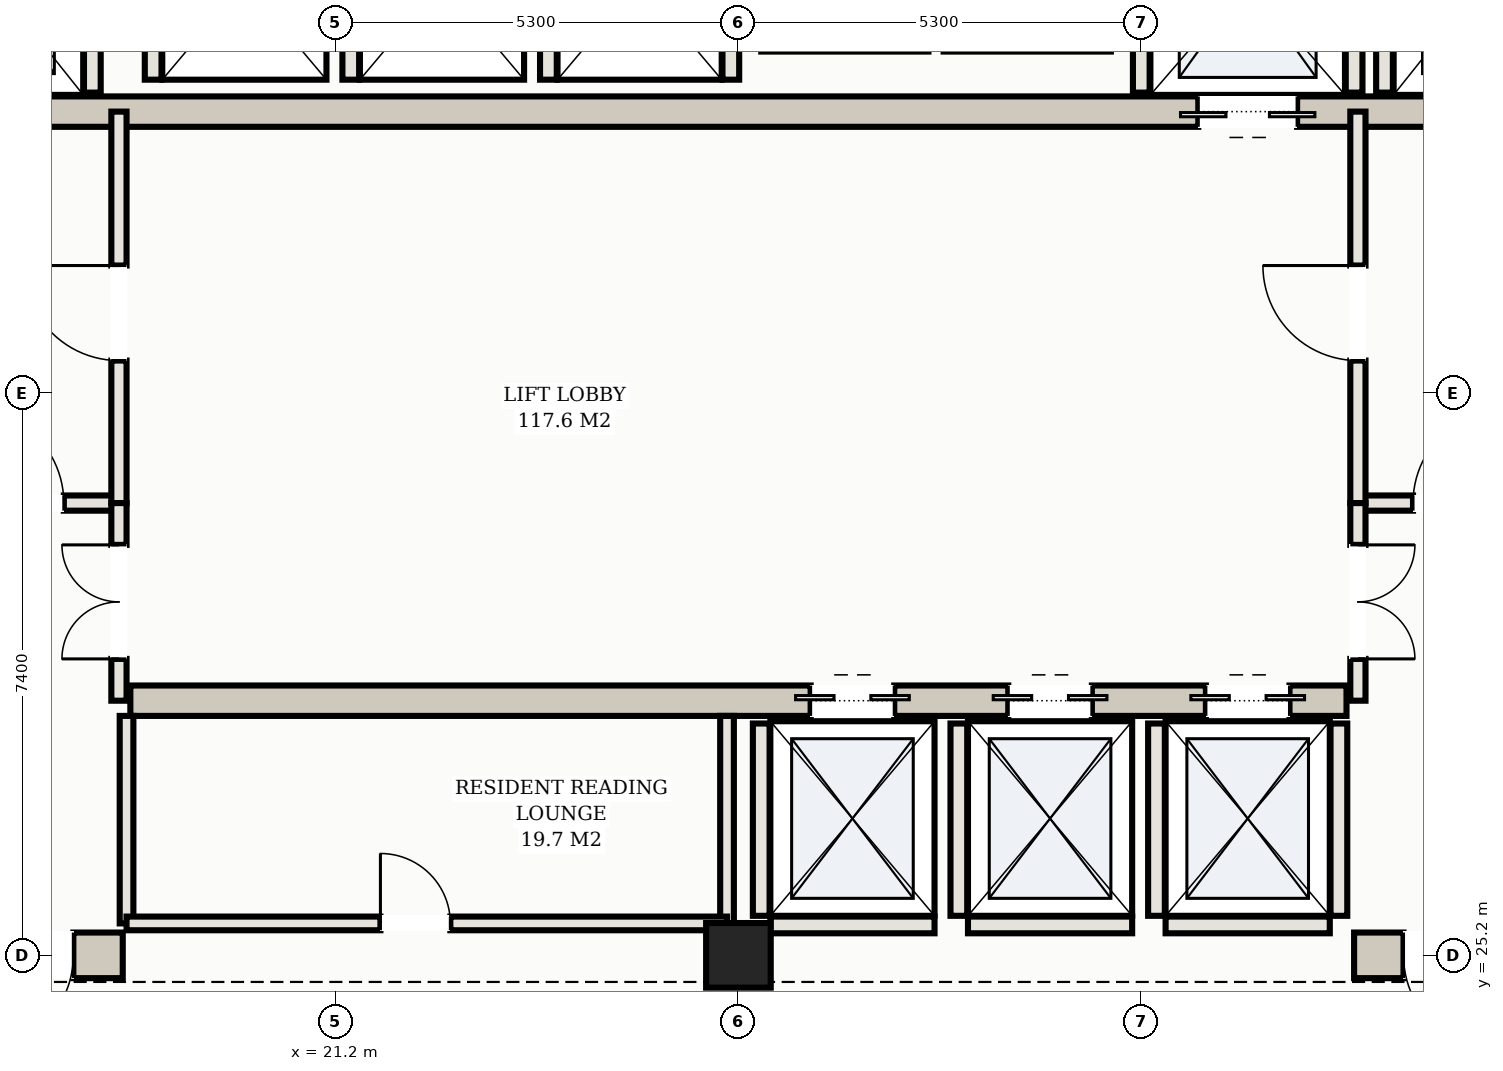
"""IFC4 building model, lengths in metres.
Left out: names, types, materials, properties, quantities, classifications, styles, units other than length and angle.
Written with IfcOpenShell. Run it as: python <this file> out.ifc"""

import sys

from ifc_helpers import new_model, si_unit, direction, frame, frame_2d, origin, origin_2d, place, context, subcontext, project, spatial, rectangle, hollow_rectangle, extrude, element, fill, save


model = new_model("IFC4")
c1 = context("Model", 3, precision=1e-05, world=origin(), true_north=direction((0.0, 1.0)))
c2 = subcontext(c1, "Body", "Model", "MODEL_VIEW")
j1 = project(units=[si_unit("LENGTHUNIT", "METRE"), si_unit("PLANEANGLEUNIT", "RADIAN")], contexts=[c1])
p1 = place(None, origin())
s1 = spatial("IfcSite", under=j1, at=p1, CompositionType="ELEMENT")
p2 = place(p1, origin())
s2 = spatial("IfcBuilding", under=s1, at=p2, CompositionType="ELEMENT")
p3 = place(p2, frame((0.0, 0.0, 168.9)))
s3 = spatial("IfcBuildingStorey", under=s2, at=p3, CompositionType="ELEMENT", Elevation=168.9)
p4 = place(p3, frame((10.3, 25.2, 0.0), z_axis=(0.0, 0.0, 1.0), x_axis=(1.0, 0.0, 0.0)))
e1 = element("IfcWall", 1, at=p4, inside=s3, PredefinedType="SHEAR", context=c2, shape_type="SweptSolid", body=[
    extrude(rectangle(XDim=8.1, YDim=0.6, at=frame_2d((4.05, 0.0))), origin(), (0.0, 0.0, 1.0), 3.1),
])
p5 = place(p4, frame((6.2, 0.0, 0.0)))
e2 = element("IfcOpeningElement", 2, at=p5, cuts=e1, PredefinedType="OPENING", context=c2, shape_type="SweptSolid", body=[
    extrude(rectangle(XDim=1.25, YDim=2.2, at=frame_2d((0.625, 1.1))), frame((0.0, 0.31, 0.0), z_axis=(0.0, -1.0, 0.0), x_axis=(1.0, 0.0, 0.0)), (0.0, 0.0, 1.0), 0.62),
])
p6 = place(p3, frame((34.6, 25.2, 0.0), z_axis=(0.0, 0.0, 1.0), x_axis=(1.0, 0.0, 0.0)))
e3 = element("IfcWall", 3, at=p6, inside=s3, PredefinedType="SHEAR", context=c2, shape_type="SweptSolid", body=[
    extrude(rectangle(XDim=8.1, YDim=0.6, at=frame_2d((4.05, 0.0))), origin(), (0.0, 0.0, 1.0), 3.1),
])
p7 = place(p6, frame((0.65, 0.0, 0.0)))
e4 = element("IfcOpeningElement", 4, at=p7, cuts=e3, PredefinedType="OPENING", context=c2, shape_type="SweptSolid", body=[
    extrude(rectangle(XDim=1.25, YDim=2.2, at=frame_2d((0.625, 1.1))), frame((0.0, 0.31, 0.0), z_axis=(0.0, -1.0, 0.0), x_axis=(1.0, 0.0, 0.0)), (0.0, 0.0, 1.0), 0.62),
])
p8 = place(p3, frame((15.5, 36.3, 0.0), z_axis=(0.0, 0.0, 1.0), x_axis=(1.0, 0.0, 0.0)))
e5 = element("IfcWall", 5, at=p8, inside=s3, PredefinedType="SHEAR", context=c2, shape_type="SweptSolid", body=[
    extrude(rectangle(XDim=22.0, YDim=0.4, at=frame_2d((11.0, 0.0))), origin(), (0.0, 0.0, 1.0), 3.1),
])
p9 = place(p8, frame((0.65, 0.0, 0.0)))
e6 = element("IfcOpeningElement", 6, at=p9, cuts=e5, PredefinedType="OPENING", context=c2, shape_type="SweptSolid", body=[
    extrude(rectangle(XDim=1.1, YDim=2.15, at=frame_2d((0.55, 1.075))), frame((0.0, 0.21, 0.0), z_axis=(0.0, -1.0, 0.0), x_axis=(1.0, 0.0, 0.0)), (0.0, 0.0, 1.0), 0.42),
])
p10 = place(p8, frame((20.25, 0.0, 0.0)))
e7 = element("IfcOpeningElement", 7, at=p10, cuts=e5, PredefinedType="OPENING", context=c2, shape_type="SweptSolid", body=[
    extrude(rectangle(XDim=1.1, YDim=2.15, at=frame_2d((0.55, 1.075))), frame((0.0, 0.21, 0.0), z_axis=(0.0, -1.0, 0.0), x_axis=(1.0, 0.0, 0.0)), (0.0, 0.0, 1.0), 0.42),
])
p11 = place(p8, frame((17.05, 0.0, 0.0)))
e8 = element("IfcOpeningElement", 8, at=p11, cuts=e5, PredefinedType="OPENING", context=c2, shape_type="SweptSolid", body=[
    extrude(rectangle(XDim=1.3, YDim=2.2, at=frame_2d((0.65, 1.1))), frame((0.0, 0.21, 0.0), z_axis=(0.0, -1.0, 0.0), x_axis=(1.0, 0.0, 0.0)), (0.0, 0.0, 1.0), 0.42),
])
p12 = place(p3, frame((18.5, 28.55, 0.0), z_axis=(0.0, 0.0, 1.0), x_axis=(1.0, 0.0, 0.0)))
e9 = element("IfcWall", 9, at=p12, inside=s3, PredefinedType="SHEAR", context=c2, shape_type="SweptSolid", body=[
    extrude(rectangle(XDim=16.0, YDim=0.4, at=frame_2d((8.0, 0.0))), origin(), (0.0, 0.0, 1.0), 3.1),
])
p13 = place(p12, frame((8.95, 0.0, 0.0)))
e10 = element("IfcOpeningElement", 10, at=p13, cuts=e9, PredefinedType="OPENING", context=c2, shape_type="SweptSolid", body=[
    extrude(rectangle(XDim=1.1, YDim=2.15, at=frame_2d((0.55, 1.075))), frame((0.0, 0.21, 0.0), z_axis=(0.0, -1.0, 0.0), x_axis=(1.0, 0.0, 0.0)), (0.0, 0.0, 1.0), 0.42),
])
p14 = place(p12, frame((11.55, 0.0, 0.0)))
e11 = element("IfcOpeningElement", 11, at=p14, cuts=e9, PredefinedType="OPENING", context=c2, shape_type="SweptSolid", body=[
    extrude(rectangle(XDim=1.1, YDim=2.15, at=frame_2d((0.55, 1.075))), frame((0.0, 0.21, 0.0), z_axis=(0.0, -1.0, 0.0), x_axis=(1.0, 0.0, 0.0)), (0.0, 0.0, 1.0), 0.42),
])
p15 = place(p12, frame((14.15, 0.0, 0.0)))
e12 = element("IfcOpeningElement", 12, at=p15, cuts=e9, PredefinedType="OPENING", context=c2, shape_type="SweptSolid", body=[
    extrude(rectangle(XDim=1.1, YDim=2.15, at=frame_2d((0.55, 1.075))), frame((0.0, 0.21, 0.0), z_axis=(0.0, -1.0, 0.0), x_axis=(1.0, 0.0, 0.0)), (0.0, 0.0, 1.0), 0.42),
])
p16 = place(p3, frame((26.5, 25.2, 0.0), z_axis=(0.0, 0.0, 1.0), x_axis=(1.0, 0.0, 0.0)))
e13 = element("IfcColumn", 13, at=p16, inside=s3, PredefinedType="COLUMN", context=c2, shape_type="SweptSolid", body=[
    extrude(hollow_rectangle(XDim=0.85, YDim=0.85, WallThickness=0.028, at=origin_2d()), origin(), (0.0, 0.0, 1.0), 3.3),
])
for number, where, z_axis, x_axis in (
    (14, (18.0, 36.55, 0.0), (0.0, 0.0, 1.0), (0.0, 1.0, 0.0)),
    (15, (35.0, 36.55, 0.0), (0.0, 0.0, 1.0), (0.0, 1.0, 0.0)),
    (16, (31.8, 36.55, 0.0), (0.0, 0.0, 1.0), (0.0, 1.0, 0.0)),
    (17, (34.6, 36.55, 0.0), (0.0, 0.0, 1.0), (0.0, 1.0, 0.0)),
):
    element("IfcWall", number, at=place(p3, frame(where, z_axis=z_axis, x_axis=x_axis)), inside=s3, PredefinedType="SOLIDWALL", context=c2, shape_type="SweptSolid", body=[
        extrude(rectangle(XDim=2.93, YDim=0.22, at=frame_2d((1.465, 0.0))), origin(), (0.0, 0.0, 1.0), 3.1),
    ])
p17 = place(p3, frame((26.8, 25.72, 0.0), z_axis=(0.0, 0.0, 1.0), x_axis=(0.0, 1.0, 0.0)))
e18 = element("IfcWall", 18, at=p17, inside=s3, PredefinedType="SOLIDWALL", context=c2, shape_type="SweptSolid", body=[
    extrude(rectangle(XDim=2.53, YDim=0.22, at=frame_2d((1.265, 0.0))), origin(), (0.0, 0.0, 1.0), 3.1),
])
p18 = place(p3, frame((26.92, 25.6, 0.0), z_axis=(0.0, 0.0, 1.0), x_axis=(1.0, 0.0, 0.0)))
e19 = element("IfcWall", 19, at=p18, inside=s3, PredefinedType="SOLIDWALL", context=c2, shape_type="SweptSolid", body=[
    extrude(rectangle(XDim=2.16, YDim=0.22, at=frame_2d((1.08, 0.0))), origin(), (0.0, 0.0, 1.0), 2.295),
])
p19 = place(p3, frame((29.4, 25.72, 0.0), z_axis=(0.0, 0.0, 1.0), x_axis=(0.0, 1.0, 0.0)))
e20 = element("IfcWall", 20, at=p19, inside=s3, PredefinedType="SOLIDWALL", context=c2, shape_type="SweptSolid", body=[
    extrude(rectangle(XDim=2.53, YDim=0.22, at=frame_2d((1.265, 0.0))), origin(), (0.0, 0.0, 1.0), 3.1),
])
p20 = place(p3, frame((29.52, 25.6, 0.0), z_axis=(0.0, 0.0, 1.0), x_axis=(1.0, 0.0, 0.0)))
e21 = element("IfcWall", 21, at=p20, inside=s3, PredefinedType="SOLIDWALL", context=c2, shape_type="SweptSolid", body=[
    extrude(rectangle(XDim=2.16, YDim=0.22, at=frame_2d((1.08, 0.0))), origin(), (0.0, 0.0, 1.0), 2.295),
])
for number, where, z_axis, x_axis in (
    (22, (32.0, 25.72, 0.0), (0.0, 0.0, 1.0), (0.0, 1.0, 0.0)),
    (23, (34.4, 25.72, 0.0), (0.0, 0.0, 1.0), (0.0, 1.0, 0.0)),
):
    element("IfcWall", number, at=place(p3, frame(where, z_axis=z_axis, x_axis=x_axis)), inside=s3, PredefinedType="SOLIDWALL", context=c2, shape_type="SweptSolid", body=[
        extrude(rectangle(XDim=2.53, YDim=0.22, at=frame_2d((1.265, 0.0))), origin(), (0.0, 0.0, 1.0), 3.1),
    ])
p21 = place(p3, frame((32.12, 25.6, 0.0), z_axis=(0.0, 0.0, 1.0), x_axis=(1.0, 0.0, 0.0)))
e24 = element("IfcWall", 24, at=p21, inside=s3, PredefinedType="SOLIDWALL", context=c2, shape_type="SweptSolid", body=[
    extrude(rectangle(XDim=2.16, YDim=0.22, at=frame_2d((1.08, 0.0))), origin(), (0.0, 0.0, 1.0), 2.295),
])
for number, where, z_axis, x_axis in (
    (25, (18.8, 36.72, 0.0), (0.0, 0.0, 1.0), (0.0, 1.0, 0.0)),
    (26, (21.4, 36.72, 0.0), (0.0, 0.0, 1.0), (0.0, 1.0, 0.0)),
    (27, (24.0, 36.72, 0.0), (0.0, 0.0, 1.0), (0.0, 1.0, 0.0)),
    (28, (26.4, 36.72, 0.0), (0.0, 0.0, 1.0), (0.0, 1.0, 0.0)),
):
    element("IfcWall", number, at=place(p3, frame(where, z_axis=z_axis, x_axis=x_axis)), inside=s3, PredefinedType="SOLIDWALL", context=c2, shape_type="SweptSolid", body=[
        extrude(rectangle(XDim=2.56, YDim=0.22, at=frame_2d((1.28, 0.0))), origin(), (0.0, 0.0, 1.0), 3.1),
    ])
p22 = place(p3, frame((15.1, 31.15, 0.0), z_axis=(0.0, 0.0, 1.0), x_axis=(1.0, 0.0, 0.0)))
e29 = element("IfcWall", 29, at=p22, inside=s3, PredefinedType="PARTITIONING", context=c2, shape_type="SweptSolid", body=[
    extrude(rectangle(XDim=3.25, YDim=0.2, at=frame_2d((1.625, 0.0))), origin(), (0.0, 0.0, 1.0), 2.38),
])
p23 = place(p22, frame((1.275, 0.0, 0.0)))
e30 = element("IfcOpeningElement", 30, at=p23, cuts=e29, PredefinedType="OPENING", context=c2, shape_type="SweptSolid", body=[
    extrude(rectangle(XDim=1.25, YDim=2.2, at=frame_2d((0.625, 1.1))), frame((0.0, 0.11, 0.0), z_axis=(0.0, -1.0, 0.0), x_axis=(1.0, 0.0, 0.0)), (0.0, 0.0, 1.0), 0.22),
])
p24 = place(p3, frame((18.35, 31.15, 0.0), z_axis=(0.0, 0.0, 1.0), x_axis=(0.0, 1.0, 0.0)))
e31 = element("IfcWall", 31, at=p24, inside=s3, PredefinedType="PARTITIONING", context=c2, shape_type="SweptSolid", body=[
    extrude(rectangle(XDim=5.15, YDim=0.2, at=frame_2d((2.575, 0.0))), origin(), (0.0, 0.0, 1.0), 2.38),
])
p25 = place(p24, frame((1.875, 0.0, 0.0)))
e32 = element("IfcOpeningElement", 32, at=p25, cuts=e31, PredefinedType="OPENING", context=c2, shape_type="SweptSolid", body=[
    extrude(rectangle(XDim=1.25, YDim=2.2, at=frame_2d((0.625, 1.1))), frame((0.0, 0.11, 0.0), z_axis=(0.0, -1.0, 0.0), x_axis=(1.0, 0.0, 0.0)), (0.0, 0.0, 1.0), 0.22),
])
p26 = place(p3, frame((34.65, 31.15, 0.0), z_axis=(0.0, 0.0, 1.0), x_axis=(1.0, 0.0, 0.0)))
e33 = element("IfcWall", 33, at=p26, inside=s3, PredefinedType="PARTITIONING", context=c2, shape_type="SweptSolid", body=[
    extrude(rectangle(XDim=3.25, YDim=0.2, at=frame_2d((1.625, 0.0))), origin(), (0.0, 0.0, 1.0), 2.38),
])
p27 = place(p26, frame((0.725, 0.0, 0.0)))
e34 = element("IfcOpeningElement", 34, at=p27, cuts=e33, PredefinedType="OPENING", context=c2, shape_type="SweptSolid", body=[
    extrude(rectangle(XDim=1.25, YDim=2.2, at=frame_2d((0.625, 1.1))), frame((0.0, 0.11, 0.0), z_axis=(0.0, -1.0, 0.0), x_axis=(1.0, 0.0, 0.0)), (0.0, 0.0, 1.0), 0.22),
])
p28 = place(p3, frame((34.65, 31.15, 0.0), z_axis=(0.0, 0.0, 1.0), x_axis=(0.0, 1.0, 0.0)))
e35 = element("IfcWall", 35, at=p28, inside=s3, PredefinedType="PARTITIONING", context=c2, shape_type="SweptSolid", body=[
    extrude(rectangle(XDim=5.15, YDim=0.2, at=frame_2d((2.575, 0.0))), origin(), (0.0, 0.0, 1.0), 2.38),
])
p29 = place(p28, frame((1.875, 0.0, 0.0)))
e36 = element("IfcOpeningElement", 36, at=p29, cuts=e35, PredefinedType="OPENING", context=c2, shape_type="SweptSolid", body=[
    extrude(rectangle(XDim=1.25, YDim=2.2, at=frame_2d((0.625, 1.1))), frame((0.0, 0.11, 0.0), z_axis=(0.0, -1.0, 0.0), x_axis=(1.0, 0.0, 0.0)), (0.0, 0.0, 1.0), 0.22),
])
p30 = place(p3, frame((18.35, 28.55, 0.0), z_axis=(0.0, 0.0, 1.0), x_axis=(0.0, 1.0, 0.0)))
e37 = element("IfcWall", 37, at=p30, inside=s3, PredefinedType="PARTITIONING", context=c2, shape_type="SweptSolid", body=[
    extrude(rectangle(XDim=2.6, YDim=0.2, at=frame_2d((1.3, 0.0))), origin(), (0.0, 0.0, 1.0), 2.38),
])
p31 = place(p30, frame((0.55, 0.0, 0.0)))
e38 = element("IfcOpeningElement", 38, at=p31, cuts=e37, PredefinedType="OPENING", context=c2, shape_type="SweptSolid", body=[
    extrude(rectangle(XDim=1.5, YDim=2.25, at=frame_2d((0.75, 1.125))), frame((0.0, 0.11, 0.0), z_axis=(0.0, -1.0, 0.0), x_axis=(1.0, 0.0, 0.0)), (0.0, 0.0, 1.0), 0.22),
])
p32 = place(p3, frame((34.65, 28.55, 0.0), z_axis=(0.0, 0.0, 1.0), x_axis=(0.0, 1.0, 0.0)))
e39 = element("IfcWall", 39, at=p32, inside=s3, PredefinedType="PARTITIONING", context=c2, shape_type="SweptSolid", body=[
    extrude(rectangle(XDim=2.6, YDim=0.2, at=frame_2d((1.3, 0.0))), origin(), (0.0, 0.0, 1.0), 2.38),
])
p33 = place(p32, frame((0.55, 0.0, 0.0)))
e40 = element("IfcOpeningElement", 40, at=p33, cuts=e39, PredefinedType="OPENING", context=c2, shape_type="SweptSolid", body=[
    extrude(rectangle(XDim=1.5, YDim=2.25, at=frame_2d((0.75, 1.125))), frame((0.0, 0.11, 0.0), z_axis=(0.0, -1.0, 0.0), x_axis=(1.0, 0.0, 0.0)), (0.0, 0.0, 1.0), 0.22),
])
for number, where, z_axis, x_axis in (
    (41, (18.45, 25.62, 0.0), (0.0, 0.0, 1.0), (0.0, 1.0, 0.0)),
    (42, (26.35, 25.62, 0.0), (0.0, 0.0, 1.0), (0.0, 1.0, 0.0)),
):
    element("IfcWall", number, at=place(p3, frame(where, z_axis=z_axis, x_axis=x_axis)), inside=s3, PredefinedType="PARTITIONING", context=c2, shape_type="SweptSolid", body=[
        extrude(rectangle(XDim=2.73, YDim=0.18, at=frame_2d((1.365, 0.0))), origin(), (0.0, 0.0, 1.0), 2.38),
    ])
p34 = place(p3, frame((18.45, 25.62, 0.0), z_axis=(0.0, 0.0, 1.0), x_axis=(1.0, 0.0, 0.0)))
e43 = element("IfcWall", 43, at=p34, inside=s3, PredefinedType="PARTITIONING", context=c2, shape_type="SweptSolid", body=[
    extrude(rectangle(XDim=7.9, YDim=0.18, at=frame_2d((3.95, 0.0))), origin(), (0.0, 0.0, 1.0), 2.38),
])
p35 = place(p34, frame((3.34, 0.0, 0.0)))
e44 = element("IfcOpeningElement", 44, at=p35, cuts=e43, PredefinedType="OPENING", context=c2, shape_type="SweptSolid", body=[
    extrude(rectangle(XDim=0.92, YDim=2.15, at=frame_2d((0.46, 1.075))), frame((0.0, 0.1, 0.0), z_axis=(0.0, -1.0, 0.0), x_axis=(1.0, 0.0, 0.0)), (0.0, 0.0, 1.0), 0.2),
])
p36 = place(p11, frame((1.3, 0.0, 0.0), z_axis=(0.0, 0.0, 1.0), x_axis=(-1.0, 0.0, 0.0)))
e45 = element("IfcDoor", 45, at=p36, inside=s3, OperationType="DOUBLE_DOOR_SLIDING", PredefinedType="DOOR", context=c2, shape_type="SweptSolid", body=[
    extrude(rectangle(XDim=1.3, YDim=2.2, at=frame_2d((0.65, 1.1))), frame((0.0, 0.025, 0.0), z_axis=(0.0, -1.0, 0.0), x_axis=(1.0, 0.0, 0.0)), (0.0, 0.0, 1.0), 0.05),
])
fill(e8, e45)
p37 = place(p13, origin())
e46 = element("IfcDoor", 46, at=p37, inside=s3, OperationType="DOUBLE_DOOR_SLIDING", PredefinedType="DOOR", context=c2, shape_type="SweptSolid", body=[
    extrude(rectangle(XDim=1.1, YDim=2.15, at=frame_2d((0.55, 1.075))), frame((0.0, 0.025, 0.0), z_axis=(0.0, -1.0, 0.0), x_axis=(1.0, 0.0, 0.0)), (0.0, 0.0, 1.0), 0.05),
])
fill(e10, e46)
p38 = place(p14, origin())
e47 = element("IfcDoor", 47, at=p38, inside=s3, OperationType="DOUBLE_DOOR_SLIDING", PredefinedType="DOOR", context=c2, shape_type="SweptSolid", body=[
    extrude(rectangle(XDim=1.1, YDim=2.15, at=frame_2d((0.55, 1.075))), frame((0.0, 0.025, 0.0), z_axis=(0.0, -1.0, 0.0), x_axis=(1.0, 0.0, 0.0)), (0.0, 0.0, 1.0), 0.05),
])
fill(e11, e47)
p39 = place(p15, origin())
e48 = element("IfcDoor", 48, at=p39, inside=s3, OperationType="DOUBLE_DOOR_SLIDING", PredefinedType="DOOR", context=c2, shape_type="SweptSolid", body=[
    extrude(rectangle(XDim=1.1, YDim=2.15, at=frame_2d((0.55, 1.075))), frame((0.0, 0.025, 0.0), z_axis=(0.0, -1.0, 0.0), x_axis=(1.0, 0.0, 0.0)), (0.0, 0.0, 1.0), 0.05),
])
fill(e12, e48)
p40 = place(p5, frame((1.25, 0.0, 0.0), z_axis=(0.0, 0.0, 1.0), x_axis=(-1.0, 0.0, 0.0)))
e49 = element("IfcDoor", 49, at=p40, inside=s3, OperationType="SINGLE_SWING_RIGHT", PredefinedType="DOOR", context=c2, shape_type="SweptSolid", body=[
    extrude(rectangle(XDim=1.25, YDim=2.2, at=frame_2d((0.625, 1.1))), frame((0.0, 0.025, 0.0), z_axis=(0.0, -1.0, 0.0), x_axis=(1.0, 0.0, 0.0)), (0.0, 0.0, 1.0), 0.05),
])
fill(e2, e49)
p41 = place(p7, frame((1.25, 0.0, 0.0), z_axis=(0.0, 0.0, 1.0), x_axis=(-1.0, 0.0, 0.0)))
e50 = element("IfcDoor", 50, at=p41, inside=s3, OperationType="SINGLE_SWING_LEFT", PredefinedType="DOOR", context=c2, shape_type="SweptSolid", body=[
    extrude(rectangle(XDim=1.25, YDim=2.2, at=frame_2d((0.625, 1.1))), frame((0.0, 0.025, 0.0), z_axis=(0.0, -1.0, 0.0), x_axis=(1.0, 0.0, 0.0)), (0.0, 0.0, 1.0), 0.05),
])
fill(e4, e50)
p42 = place(p23, origin())
e51 = element("IfcDoor", 51, at=p42, inside=s3, OperationType="SINGLE_SWING_LEFT", PredefinedType="DOOR", context=c2, shape_type="SweptSolid", body=[
    extrude(rectangle(XDim=1.25, YDim=2.2, at=frame_2d((0.625, 1.1))), frame((0.0, 0.025, 0.0), z_axis=(0.0, -1.0, 0.0), x_axis=(1.0, 0.0, 0.0)), (0.0, 0.0, 1.0), 0.05),
])
fill(e30, e51)
p43 = place(p25, origin())
e52 = element("IfcDoor", 52, at=p43, inside=s3, OperationType="SINGLE_SWING_RIGHT", PredefinedType="DOOR", context=c2, shape_type="SweptSolid", body=[
    extrude(rectangle(XDim=1.25, YDim=2.2, at=frame_2d((0.625, 1.1))), frame((0.0, 0.025, 0.0), z_axis=(0.0, -1.0, 0.0), x_axis=(1.0, 0.0, 0.0)), (0.0, 0.0, 1.0), 0.05),
])
fill(e32, e52)
p44 = place(p27, origin())
e53 = element("IfcDoor", 53, at=p44, inside=s3, OperationType="SINGLE_SWING_RIGHT", PredefinedType="DOOR", context=c2, shape_type="SweptSolid", body=[
    extrude(rectangle(XDim=1.25, YDim=2.2, at=frame_2d((0.625, 1.1))), frame((0.0, 0.025, 0.0), z_axis=(0.0, -1.0, 0.0), x_axis=(1.0, 0.0, 0.0)), (0.0, 0.0, 1.0), 0.05),
])
fill(e34, e53)
p45 = place(p29, origin())
e54 = element("IfcDoor", 54, at=p45, inside=s3, OperationType="SINGLE_SWING_RIGHT", PredefinedType="DOOR", context=c2, shape_type="SweptSolid", body=[
    extrude(rectangle(XDim=1.25, YDim=2.2, at=frame_2d((0.625, 1.1))), frame((0.0, 0.025, 0.0), z_axis=(0.0, -1.0, 0.0), x_axis=(1.0, 0.0, 0.0)), (0.0, 0.0, 1.0), 0.05),
])
fill(e36, e54)
p46 = place(p31, origin())
e55 = element("IfcDoor", 55, at=p46, inside=s3, OperationType="DOUBLE_DOOR_SINGLE_SWING", PredefinedType="DOOR", context=c2, shape_type="SweptSolid", body=[
    extrude(rectangle(XDim=1.5, YDim=2.25, at=frame_2d((0.75, 1.125))), frame((0.0, 0.025, 0.0), z_axis=(0.0, -1.0, 0.0), x_axis=(1.0, 0.0, 0.0)), (0.0, 0.0, 1.0), 0.05),
])
fill(e38, e55)
p47 = place(p33, frame((1.5, 0.0, 0.0), z_axis=(0.0, 0.0, 1.0), x_axis=(-1.0, 0.0, 0.0)))
e56 = element("IfcDoor", 56, at=p47, inside=s3, OperationType="DOUBLE_DOOR_SINGLE_SWING", PredefinedType="DOOR", context=c2, shape_type="SweptSolid", body=[
    extrude(rectangle(XDim=1.5, YDim=2.25, at=frame_2d((0.75, 1.125))), frame((0.0, 0.025, 0.0), z_axis=(0.0, -1.0, 0.0), x_axis=(1.0, 0.0, 0.0)), (0.0, 0.0, 1.0), 0.05),
])
fill(e40, e56)
p48 = place(p35, origin())
e57 = element("IfcDoor", 57, at=p48, inside=s3, OperationType="SINGLE_SWING_LEFT", PredefinedType="DOOR", context=c2, shape_type="SweptSolid", body=[
    extrude(rectangle(XDim=0.92, YDim=2.15, at=frame_2d((0.46, 1.075))), frame((0.0, 0.025, 0.0), z_axis=(0.0, -1.0, 0.0), x_axis=(1.0, 0.0, 0.0)), (0.0, 0.0, 1.0), 0.05),
])
fill(e44, e57)
save(model, sys.argv[1])
